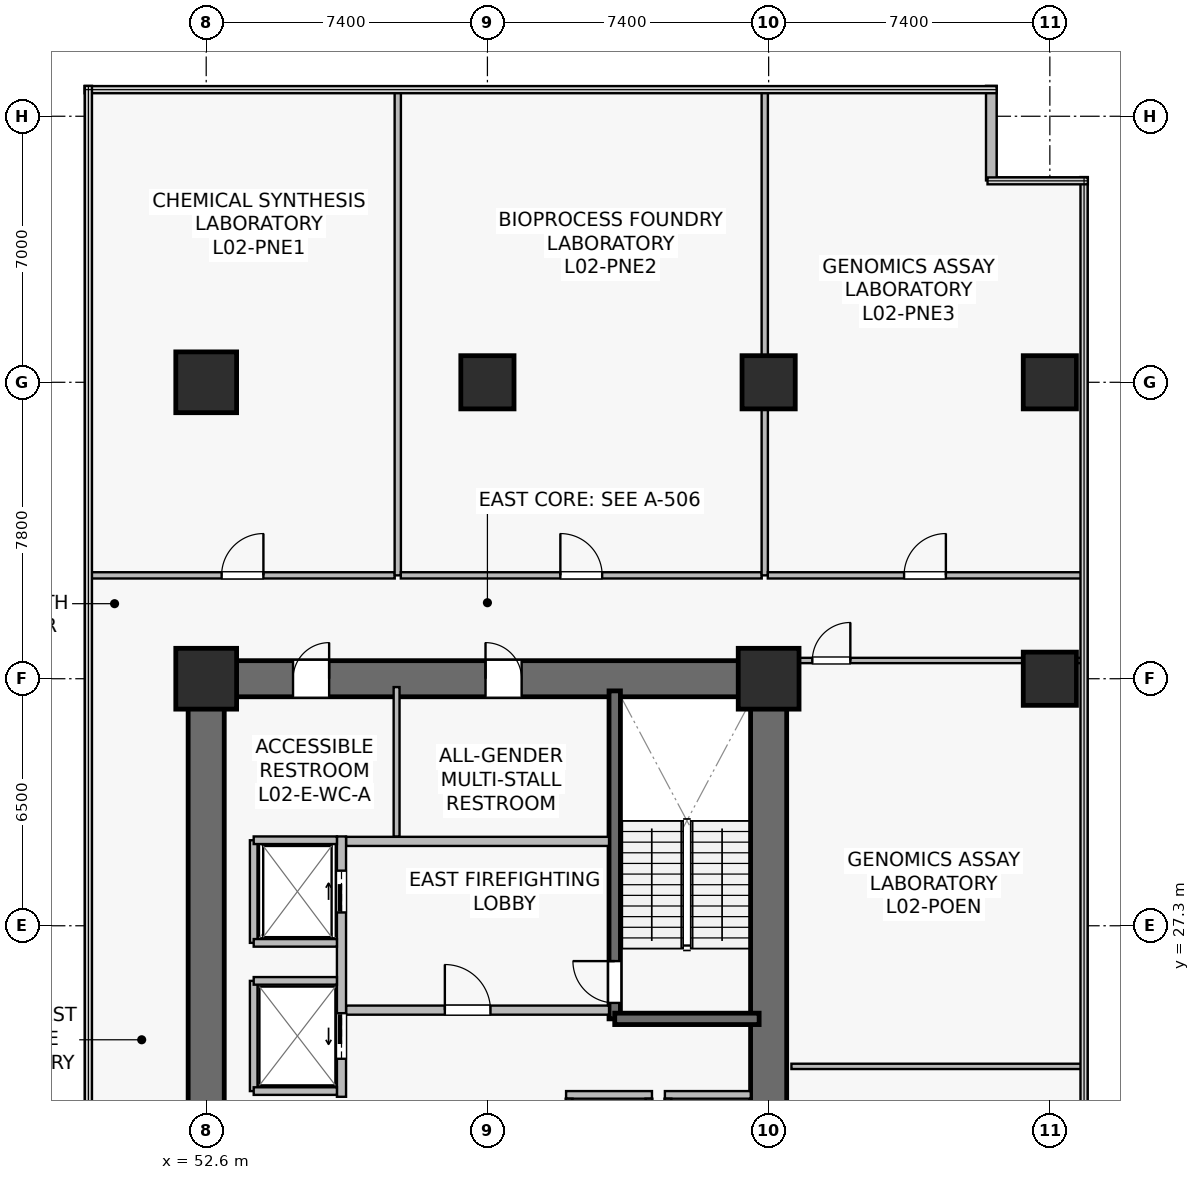
"""IFC4 building model, lengths in metres.
Left out: names, types, materials, properties, quantities, classifications, styles, units other than length and angle.
Written with IfcOpenShell. Run it as: python <this file> out.ifc"""

import sys

from ifc_helpers import new_model, si_unit, direction, frame, frame_2d, origin, origin_2d, place, context, subcontext, project, spatial, rectangle, extrude, source, transform, mapped, element, fill, save


model = new_model("IFC4")
c1 = context("Model", 3, precision=1e-05, world=origin(), true_north=direction((0.0, 1.0)))
c2 = subcontext(c1, "Body", "Model", "MODEL_VIEW")
j1 = project(units=[si_unit("LENGTHUNIT", "METRE"), si_unit("PLANEANGLEUNIT", "RADIAN")], contexts=[c1])
p1 = place(None, origin())
s1 = spatial("IfcSite", under=j1, at=p1, CompositionType="ELEMENT")
p2 = place(p1, origin())
s2 = spatial("IfcBuilding", under=s1, at=p2, CompositionType="ELEMENT")
p3 = place(p2, frame((0.0, 0.0, 5.4)))
s3 = spatial("IfcBuildingStorey", under=s2, at=p3, CompositionType="ELEMENT", Elevation=5.4)
p4 = place(p3, frame((52.125, 33.8, 0.0), z_axis=(0.0, 0.0, 1.0), x_axis=(1.0, 0.0, 0.0)))
e1 = element("IfcWall", 1, at=p4, inside=s3, PredefinedType="SHEAR", context=c2, shape_type="SweptSolid", body=[
    extrude(rectangle(XDim=15.75, YDim=0.95, at=frame_2d((7.875, 0.0))), origin(), (0.0, 0.0, 1.0), 4.45),
])
p5 = place(p4, frame((7.825, 0.0, 0.0)))
e2 = element("IfcOpeningElement", 2, at=p5, cuts=e1, PredefinedType="OPENING", context=c2, shape_type="SweptSolid", body=[
    extrude(rectangle(XDim=0.95, YDim=2.15, at=frame_2d((0.475, 1.075))), frame((0.0, 0.485, 0.0), z_axis=(0.0, -1.0, 0.0), x_axis=(1.0, 0.0, 0.0)), (0.0, 0.0, 1.0), 0.97),
])
p6 = place(p4, frame((2.76, 0.0, 0.0)))
e3 = element("IfcOpeningElement", 3, at=p6, cuts=e1, PredefinedType="OPENING", context=c2, shape_type="SweptSolid", body=[
    extrude(rectangle(XDim=0.95, YDim=2.15, at=frame_2d((0.475, 1.075))), frame((0.0, 0.485, 0.0), z_axis=(0.0, -1.0, 0.0), x_axis=(1.0, 0.0, 0.0)), (0.0, 0.0, 1.0), 0.97),
])
p7 = place(p3, frame((52.6, 15.275, 0.0), z_axis=(0.0, 0.0, 1.0), x_axis=(0.0, 1.0, 0.0)))
e4 = element("IfcWall", 4, at=p7, inside=s3, PredefinedType="SHEAR", context=c2, shape_type="SweptSolid", body=[
    extrude(rectangle(XDim=18.05, YDim=0.95, at=frame_2d((9.025, 0.0))), origin(), (0.0, 0.0, 1.0), 4.45),
])
p8 = place(p7, frame((3.275, 0.0, 0.0)))
e5 = element("IfcOpeningElement", 5, at=p8, cuts=e4, PredefinedType="OPENING", context=c2, shape_type="SweptSolid", body=[
    extrude(rectangle(XDim=1.42, YDim=2.2, at=frame_2d((0.71, 1.1))), frame((0.0, 0.485, 0.0), z_axis=(0.0, -1.0, 0.0), x_axis=(1.0, 0.0, 0.0)), (0.0, 0.0, 1.0), 0.97),
])
p9 = place(p3, frame((67.4, 15.275, 0.0), z_axis=(0.0, 0.0, 1.0), x_axis=(0.0, 1.0, 0.0)))
e6 = element("IfcWall", 6, at=p9, inside=s3, PredefinedType="SHEAR", context=c2, shape_type="SweptSolid", body=[
    extrude(rectangle(XDim=18.05, YDim=0.95, at=frame_2d((9.025, 0.0))), origin(), (0.0, 0.0, 1.0), 4.45),
])
p10 = place(p3, frame((63.35, 24.85, 0.0), z_axis=(0.0, 0.0, 1.0), x_axis=(0.0, 1.0, 0.0)))
e7 = element("IfcWall", 7, at=p10, inside=s3, PredefinedType="SHEAR", context=c2, shape_type="SweptSolid", body=[
    extrude(rectangle(XDim=8.63, YDim=0.3, at=frame_2d((4.315, 0.0))), origin(), (0.0, 0.0, 1.0), 4.45),
])
p11 = place(p10, frame((0.42, 0.0, 0.0)))
e8 = element("IfcOpeningElement", 8, at=p11, cuts=e7, PredefinedType="OPENING", context=c2, shape_type="SweptSolid", body=[
    extrude(rectangle(XDim=1.1, YDim=2.15, at=frame_2d((0.55, 1.075))), frame((0.0, 0.16, 0.0), z_axis=(0.0, -1.0, 0.0), x_axis=(1.0, 0.0, 0.0)), (0.0, 0.0, 1.0), 0.32),
])
p12 = place(p3, frame((63.35, 24.85, 0.0), z_axis=(0.0, 0.0, 1.0), x_axis=(1.0, 0.0, 0.0)))
e9 = element("IfcWall", 9, at=p12, inside=s3, PredefinedType="SHEAR", context=c2, shape_type="SweptSolid", body=[
    extrude(rectangle(XDim=3.8, YDim=0.3, at=frame_2d((1.9, 0.0))), origin(), (0.0, 0.0, 1.0), 4.45),
])
m1 = source(origin(), c2, "Body", "SweptSolid", [
    extrude(rectangle(XDim=1.6, YDim=1.6, at=origin_2d()), origin(), (0.0, 0.0, 1.0), 4.8),
])
for number, where, z_axis, x_axis in (
    (10, (52.6, 33.8, 0.0), (0.0, 0.0, 1.0), (1.0, 0.0, 0.0)),
    (11, (67.4, 33.8, 0.0), (0.0, 0.0, 1.0), (1.0, 0.0, 0.0)),
    (12, (52.6, 41.6, 0.0), (0.0, 0.0, 1.0), (1.0, 0.0, 0.0)),
):
    element("IfcColumn", number, at=place(p3, frame(where, z_axis=z_axis, x_axis=x_axis)), inside=s3, PredefinedType="COLUMN", context=c2, shape_type="MappedRepresentation", body=[
        mapped(m1, transform((0.0, 0.0, 0.0), scale=1.0)),
    ])
m2 = source(origin(), c2, "Body", "SweptSolid", [
    extrude(rectangle(XDim=1.4, YDim=1.4, at=origin_2d()), origin(), (0.0, 0.0, 1.0), 4.8),
])
for number, where, z_axis, x_axis in (
    (13, (60.0, 41.6, 0.0), (0.0, 0.0, 1.0), (1.0, 0.0, 0.0)),
    (14, (67.4, 41.6, 0.0), (0.0, 0.0, 1.0), (1.0, 0.0, 0.0)),
    (15, (74.8, 33.8, 0.0), (0.0, 0.0, 1.0), (1.0, 0.0, 0.0)),
    (16, (74.8, 41.6, 0.0), (0.0, 0.0, 1.0), (1.0, 0.0, 0.0)),
):
    element("IfcColumn", number, at=place(p3, frame(where, z_axis=z_axis, x_axis=x_axis)), inside=s3, PredefinedType="COLUMN", context=c2, shape_type="MappedRepresentation", body=[
        mapped(m2, transform((0.0, 0.0, 0.0), scale=1.0)),
    ])
p13 = place(p3, frame((73.26, 46.912, 0.0), z_axis=(0.0, 0.0, 1.0), x_axis=(0.0, 1.0, 0.0)))
e17 = element("IfcWall", 17, at=p13, inside=s3, PredefinedType="STANDARD", context=c2, shape_type="SweptSolid", body=[
    extrude(rectangle(XDim=2.488, YDim=0.28, at=frame_2d((1.244, 0.0))), origin(), (0.0, 0.0, 1.0), 4.45),
])
p14 = place(p3, frame((56.28, 25.08, 0.0), z_axis=(0.0, 0.0, 1.0), x_axis=(1.0, 0.0, 0.0)))
e18 = element("IfcWall", 18, at=p14, inside=s3, PredefinedType="SOLIDWALL", context=c2, shape_type="SweptSolid", body=[
    extrude(rectangle(XDim=6.92, YDim=0.24, at=frame_2d((3.46, 0.0))), origin(), (0.0, 0.0, 1.0), 3.735),
])
p15 = place(p14, frame((2.6, 0.0, 0.0)))
e19 = element("IfcOpeningElement", 19, at=p15, cuts=e18, PredefinedType="OPENING", context=c2, shape_type="SweptSolid", body=[
    extrude(rectangle(XDim=1.2, YDim=2.16, at=frame_2d((0.6, 1.08))), frame((0.0, 0.13, 0.0), z_axis=(0.0, -1.0, 0.0), x_axis=(1.0, 0.0, 0.0)), (0.0, 0.0, 1.0), 0.26),
])
p16 = place(p3, frame((56.28, 29.52, 0.0), z_axis=(0.0, 0.0, 1.0), x_axis=(1.0, 0.0, 0.0)))
e20 = element("IfcWall", 20, at=p16, inside=s3, PredefinedType="SOLIDWALL", context=c2, shape_type="SweptSolid", body=[
    extrude(rectangle(XDim=6.92, YDim=0.24, at=frame_2d((3.46, 0.0))), origin(), (0.0, 0.0, 1.0), 3.735),
])
p17 = place(p3, frame((56.16, 22.8, 0.0), z_axis=(0.0, 0.0, 1.0), x_axis=(0.0, 1.0, 0.0)))
e21 = element("IfcWall", 21, at=p17, inside=s3, PredefinedType="SOLIDWALL", context=c2, shape_type="SweptSolid", body=[
    extrude(rectangle(XDim=6.85, YDim=0.24, at=frame_2d((3.425, 0.0))), origin(), (0.0, 0.0, 1.0), 3.535),
])
p18 = place(p17, frame((4.85, 0.0, 0.0)))
e22 = element("IfcOpeningElement", 22, at=p18, cuts=e21, PredefinedType="OPENING", context=c2, shape_type="SweptSolid", body=[
    extrude(rectangle(XDim=1.1, YDim=2.22, at=frame_2d((0.55, 1.11))), frame((0.0, 0.13, 0.0), z_axis=(0.0, -1.0, 0.0), x_axis=(1.0, 0.0, 0.0)), (0.0, 0.0, 1.0), 0.26),
])
p19 = place(p17, frame((1.0, 0.0, 0.0)))
e23 = element("IfcOpeningElement", 23, at=p19, cuts=e21, PredefinedType="OPENING", context=c2, shape_type="SweptSolid", body=[
    extrude(rectangle(XDim=1.2, YDim=2.22, at=frame_2d((0.6, 1.11))), frame((0.0, 0.13, 0.0), z_axis=(0.0, -1.0, 0.0), x_axis=(1.0, 0.0, 0.0)), (0.0, 0.0, 1.0), 0.26),
])
p20 = place(p3, frame((64.67, 22.85, 0.0), z_axis=(0.0, 0.0, 1.0), x_axis=(1.0, 0.0, 0.0)))
e24 = element("IfcWall", 24, at=p20, inside=s3, PredefinedType="SOLIDWALL", context=c2, shape_type="SweptSolid", body=[
    extrude(rectangle(XDim=2.26, YDim=0.2, at=frame_2d((1.13, 0.0))), origin(), (0.0, 0.0, 1.0), 4.45),
])
p21 = place(p3, frame((64.75, 20.85, 0.0), z_axis=(0.0, 0.0, 1.0), x_axis=(0.0, 1.0, 0.0)))
e25 = element("IfcWall", 25, at=p21, inside=s3, PredefinedType="SOLIDWALL", context=c2, shape_type="SweptSolid", body=[
    extrude(rectangle(XDim=1.9, YDim=0.18, at=frame_2d((0.95, 0.0))), origin(), (0.0, 0.0, 1.0), 4.45),
])
p22 = place(p3, frame((62.07, 22.85, 0.0), z_axis=(0.0, 0.0, 1.0), x_axis=(1.0, 0.0, 0.0)))
e26 = element("IfcWall", 26, at=p22, inside=s3, PredefinedType="SOLIDWALL", context=c2, shape_type="SweptSolid", body=[
    extrude(rectangle(XDim=2.26, YDim=0.2, at=frame_2d((1.13, 0.0))), origin(), (0.0, 0.0, 1.0), 4.45),
])
for number, where, z_axis, x_axis in (
    (27, (62.15, 20.85, 0.0), (0.0, 0.0, 1.0), (0.0, 1.0, 0.0)),
    (28, (64.25, 20.85, 0.0), (0.0, 0.0, 1.0), (0.0, 1.0, 0.0)),
):
    element("IfcWall", number, at=place(p3, frame(where, z_axis=z_axis, x_axis=x_axis)), inside=s3, PredefinedType="SOLIDWALL", context=c2, shape_type="SweptSolid", body=[
        extrude(rectangle(XDim=1.9, YDim=0.18, at=frame_2d((0.95, 0.0))), origin(), (0.0, 0.0, 1.0), 4.45),
    ])
p23 = place(p3, frame((53.85, 26.85, 0.0), z_axis=(0.0, 0.0, 1.0), x_axis=(0.0, 1.0, 0.0)))
e29 = element("IfcWall", 29, at=p23, inside=s3, PredefinedType="SOLIDWALL", context=c2, shape_type="SweptSolid", body=[
    extrude(rectangle(XDim=2.7, YDim=0.2, at=frame_2d((1.35, 0.0))), origin(), (0.0, 0.0, 1.0), 4.45),
])
p24 = place(p3, frame((53.85, 29.55, 0.0), z_axis=(0.0, 0.0, 1.0), x_axis=(1.0, 0.0, 0.0)))
e30 = element("IfcWall", 30, at=p24, inside=s3, PredefinedType="SOLIDWALL", context=c2, shape_type="SweptSolid", body=[
    extrude(rectangle(XDim=2.19, YDim=0.2, at=frame_2d((1.095, 0.0))), origin(), (0.0, 0.0, 1.0), 4.45),
])
p25 = place(p3, frame((53.85, 26.85, 0.0), z_axis=(0.0, 0.0, 1.0), x_axis=(1.0, 0.0, 0.0)))
e31 = element("IfcWall", 31, at=p25, inside=s3, PredefinedType="SOLIDWALL", context=c2, shape_type="SweptSolid", body=[
    extrude(rectangle(XDim=2.19, YDim=0.2, at=frame_2d((1.095, 0.0))), origin(), (0.0, 0.0, 1.0), 3.847),
])
p26 = place(p3, frame((53.85, 22.95, 0.0), z_axis=(0.0, 0.0, 1.0), x_axis=(0.0, 1.0, 0.0)))
e32 = element("IfcWall", 32, at=p26, inside=s3, PredefinedType="SOLIDWALL", context=c2, shape_type="SweptSolid", body=[
    extrude(rectangle(XDim=2.9, YDim=0.2, at=frame_2d((1.45, 0.0))), origin(), (0.0, 0.0, 1.0), 3.535),
])
for number, where, z_axis, x_axis in (
    (33, (53.85, 25.85, 0.0), (0.0, 0.0, 1.0), (1.0, 0.0, 0.0)),
    (34, (53.85, 22.95, 0.0), (0.0, 0.0, 1.0), (1.0, 0.0, 0.0)),
):
    element("IfcWall", number, at=place(p3, frame(where, z_axis=z_axis, x_axis=x_axis)), inside=s3, PredefinedType="SOLIDWALL", context=c2, shape_type="SweptSolid", body=[
        extrude(rectangle(XDim=2.19, YDim=0.2, at=frame_2d((1.095, 0.0))), origin(), (0.0, 0.0, 1.0), 4.45),
    ])
p27 = place(p3, frame((57.61, 29.65, 0.0), z_axis=(0.0, 0.0, 1.0), x_axis=(0.0, 1.0, 0.0)))
e35 = element("IfcWall", 35, at=p27, inside=s3, PredefinedType="PLUMBINGWALL", context=c2, shape_type="SweptSolid", body=[
    extrude(rectangle(XDim=3.93, YDim=0.155, at=frame_2d((1.965, 0.0))), origin(), (0.0, 0.0, 1.0), 4.45),
])
p28 = place(p3, frame((68.0, 23.6, 0.0), z_axis=(0.0, 0.0, 1.0), x_axis=(1.0, 0.0, 0.0)))
e36 = element("IfcWall", 36, at=p28, inside=s3, PredefinedType="PARTITIONING", context=c2, shape_type="SweptSolid", body=[
    extrude(rectangle(XDim=7.65, YDim=0.14, at=frame_2d((3.825, 0.0))), origin(), (0.0, 0.0, 1.0), 3.835),
])
p29 = place(p3, frame((68.0, 34.28, 0.0), z_axis=(0.0, 0.0, 1.0), x_axis=(1.0, 0.0, 0.0)))
e37 = element("IfcWall", 37, at=p29, inside=s3, PredefinedType="PARTITIONING", context=c2, shape_type="SweptSolid", body=[
    extrude(rectangle(XDim=7.65, YDim=0.14, at=frame_2d((3.825, 0.0))), origin(), (0.0, 0.0, 1.0), 3.835),
])
p30 = place(p29, frame((0.55, 0.0, 0.0)))
e38 = element("IfcOpeningElement", 38, at=p30, cuts=e37, PredefinedType="OPENING", context=c2, shape_type="SweptSolid", body=[
    extrude(rectangle(XDim=1.0, YDim=2.15, at=frame_2d((0.5, 1.075))), frame((0.0, 0.08, 0.0), z_axis=(0.0, -1.0, 0.0), x_axis=(1.0, 0.0, 0.0)), (0.0, 0.0, 1.0), 0.16),
])
p31 = place(p3, frame((49.55, 36.52, 0.0), z_axis=(0.0, 0.0, 1.0), x_axis=(1.0, 0.0, 0.0)))
e39 = element("IfcWall", 39, at=p31, inside=s3, PredefinedType="PARTITIONING", context=c2, shape_type="SweptSolid", body=[
    extrude(rectangle(XDim=8.011, YDim=0.165, at=frame_2d((4.005, 0.0))), origin(), (0.0, 0.0, 1.0), 3.735),
])
p32 = place(p31, frame((3.456, 0.0, 0.0)))
e40 = element("IfcOpeningElement", 40, at=p32, cuts=e39, PredefinedType="OPENING", context=c2, shape_type="SweptSolid", body=[
    extrude(rectangle(XDim=1.1, YDim=2.18, at=frame_2d((0.55, 1.09))), frame((0.0, 0.093, 0.0), z_axis=(0.0, -1.0, 0.0), x_axis=(1.0, 0.0, 0.0)), (0.0, 0.0, 1.0), 0.185),
])
p33 = place(p3, frame((57.641, 36.52, 0.0), z_axis=(0.0, 0.0, 1.0), x_axis=(0.0, 1.0, 0.0)))
e41 = element("IfcWall", 41, at=p33, inside=s3, PredefinedType="PARTITIONING", context=c2, shape_type="SweptSolid", body=[
    extrude(rectangle(XDim=12.77, YDim=0.165, at=frame_2d((6.385, 0.0))), origin(), (0.0, 0.0, 1.0), 3.635),
])
p34 = place(p3, frame((57.721, 36.52, 0.0), z_axis=(0.0, 0.0, 1.0), x_axis=(1.0, 0.0, 0.0)))
e42 = element("IfcWall", 42, at=p34, inside=s3, PredefinedType="PARTITIONING", context=c2, shape_type="SweptSolid", body=[
    extrude(rectangle(XDim=9.497, YDim=0.165, at=frame_2d((4.749, 0.0))), origin(), (0.0, 0.0, 1.0), 3.735),
])
p35 = place(p34, frame((4.198, 0.0, 0.0)))
e43 = element("IfcOpeningElement", 43, at=p35, cuts=e42, PredefinedType="OPENING", context=c2, shape_type="SweptSolid", body=[
    extrude(rectangle(XDim=1.1, YDim=2.18, at=frame_2d((0.55, 1.09))), frame((0.0, 0.093, 0.0), z_axis=(0.0, -1.0, 0.0), x_axis=(1.0, 0.0, 0.0)), (0.0, 0.0, 1.0), 0.185),
])
p36 = place(p3, frame((67.298, 36.52, 0.0), z_axis=(0.0, 0.0, 1.0), x_axis=(0.0, 1.0, 0.0)))
e44 = element("IfcWall", 44, at=p36, inside=s3, PredefinedType="PARTITIONING", context=c2, shape_type="SweptSolid", body=[
    extrude(rectangle(XDim=12.77, YDim=0.165, at=frame_2d((6.385, 0.0))), origin(), (0.0, 0.0, 1.0), 3.635),
])
p37 = place(p3, frame((67.378, 36.52, 0.0), z_axis=(0.0, 0.0, 1.0), x_axis=(1.0, 0.0, 0.0)))
e45 = element("IfcWall", 45, at=p37, inside=s3, PredefinedType="PARTITIONING", context=c2, shape_type="SweptSolid", body=[
    extrude(rectangle(XDim=8.272, YDim=0.165, at=frame_2d((4.136, 0.0))), origin(), (0.0, 0.0, 1.0), 3.735),
])
p38 = place(p37, frame((3.586, 0.0, 0.0)))
e46 = element("IfcOpeningElement", 46, at=p38, cuts=e45, PredefinedType="OPENING", context=c2, shape_type="SweptSolid", body=[
    extrude(rectangle(XDim=1.1, YDim=2.18, at=frame_2d((0.55, 1.09))), frame((0.0, 0.093, 0.0), z_axis=(0.0, -1.0, 0.0), x_axis=(1.0, 0.0, 0.0)), (0.0, 0.0, 1.0), 0.185),
])
m3 = source(origin(), c2, "Body", "SweptSolid", [
    extrude(rectangle(XDim=1.1, YDim=2.15, at=frame_2d((0.55, 1.075))), frame((0.0, 0.025, 0.0), z_axis=(0.0, -1.0, 0.0), x_axis=(1.0, 0.0, 0.0)), (0.0, 0.0, 1.0), 0.05),
])
p39 = place(p11, origin())
e47 = element("IfcDoor", 47, at=p39, inside=s3, OperationType="SINGLE_SWING_RIGHT", PredefinedType="DOOR", context=c2, shape_type="MappedRepresentation", body=[
    mapped(m3, transform((0.0, 0.0, 0.0), scale=1.0)),
])
fill(e8, e47)
m4 = source(origin(), c2, "Body", "SweptSolid", [
    extrude(rectangle(XDim=1.2, YDim=2.16, at=frame_2d((0.6, 1.08))), frame((0.0, 0.025, 0.0), z_axis=(0.0, -1.0, 0.0), x_axis=(1.0, 0.0, 0.0)), (0.0, 0.0, 1.0), 0.05),
])
p40 = place(p15, origin())
e48 = element("IfcDoor", 48, at=p40, inside=s3, OperationType="SINGLE_SWING_LEFT", PredefinedType="DOOR", context=c2, shape_type="MappedRepresentation", body=[
    mapped(m4, transform((0.0, 0.0, 0.0), scale=1.0)),
])
fill(e19, e48)
m5 = source(origin(), c2, "Body", "SweptSolid", [
    extrude(rectangle(XDim=1.1, YDim=2.22, at=frame_2d((0.55, 1.11))), frame((0.0, 0.025, 0.0), z_axis=(0.0, -1.0, 0.0), x_axis=(1.0, 0.0, 0.0)), (0.0, 0.0, 1.0), 0.05),
])
p41 = place(p18, origin())
e49 = element("IfcDoor", 49, at=p41, inside=s3, OperationType="SLIDING_TO_RIGHT", PredefinedType="USERDEFINED", context=c2, shape_type="MappedRepresentation", body=[
    mapped(m5, transform((0.0, 0.0, 0.0), scale=1.0)),
])
fill(e22, e49)
m6 = source(origin(), c2, "Body", "SweptSolid", [
    extrude(rectangle(XDim=1.2, YDim=2.22, at=frame_2d((0.6, 1.11))), frame((0.0, 0.025, 0.0), z_axis=(0.0, -1.0, 0.0), x_axis=(1.0, 0.0, 0.0)), (0.0, 0.0, 1.0), 0.05),
])
p42 = place(p19, origin())
e50 = element("IfcDoor", 50, at=p42, inside=s3, OperationType="SLIDING_TO_LEFT", PredefinedType="USERDEFINED", context=c2, shape_type="MappedRepresentation", body=[
    mapped(m6, transform((0.0, 0.0, 0.0), scale=1.0)),
])
fill(e23, e50)
m7 = source(origin(), c2, "Body", "SweptSolid", [
    extrude(rectangle(XDim=0.95, YDim=2.15, at=frame_2d((0.475, 1.075))), frame((0.0, 0.025, 0.0), z_axis=(0.0, -1.0, 0.0), x_axis=(1.0, 0.0, 0.0)), (0.0, 0.0, 1.0), 0.05),
])
p43 = place(p5, origin())
e51 = element("IfcDoor", 51, at=p43, inside=s3, OperationType="SINGLE_SWING_LEFT", PredefinedType="DOOR", context=c2, shape_type="MappedRepresentation", body=[
    mapped(m7, transform((0.0, 0.0, 0.0), scale=1.0)),
])
fill(e2, e51)
p44 = place(p6, origin())
e52 = element("IfcDoor", 52, at=p44, inside=s3, OperationType="SINGLE_SWING_RIGHT", PredefinedType="DOOR", context=c2, shape_type="MappedRepresentation", body=[
    mapped(m7, transform((0.0, 0.0, 0.0), scale=1.0)),
])
fill(e3, e52)
m8 = source(origin(), c2, "Body", "SweptSolid", [
    extrude(rectangle(XDim=1.0, YDim=2.15, at=frame_2d((0.5, 1.075))), frame((0.0, 0.025, 0.0), z_axis=(0.0, -1.0, 0.0), x_axis=(1.0, 0.0, 0.0)), (0.0, 0.0, 1.0), 0.05),
])
p45 = place(p30, origin())
e53 = element("IfcDoor", 53, at=p45, inside=s3, OperationType="SINGLE_SWING_RIGHT", PredefinedType="DOOR", context=c2, shape_type="MappedRepresentation", body=[
    mapped(m8, transform((0.0, 0.0, 0.0), scale=1.0)),
])
fill(e38, e53)
m9 = source(origin(), c2, "Body", "SweptSolid", [
    extrude(rectangle(XDim=1.1, YDim=2.18, at=frame_2d((0.55, 1.09))), frame((0.0, 0.025, 0.0), z_axis=(0.0, -1.0, 0.0), x_axis=(1.0, 0.0, 0.0)), (0.0, 0.0, 1.0), 0.05),
])
p46 = place(p32, origin())
e54 = element("IfcDoor", 54, at=p46, inside=s3, OperationType="SINGLE_SWING_RIGHT", PredefinedType="DOOR", context=c2, shape_type="MappedRepresentation", body=[
    mapped(m9, transform((0.0, 0.0, 0.0), scale=1.0)),
])
fill(e40, e54)
p47 = place(p35, origin())
e55 = element("IfcDoor", 55, at=p47, inside=s3, OperationType="SINGLE_SWING_LEFT", PredefinedType="DOOR", context=c2, shape_type="MappedRepresentation", body=[
    mapped(m9, transform((0.0, 0.0, 0.0), scale=1.0)),
])
fill(e43, e55)
p48 = place(p38, origin())
e56 = element("IfcDoor", 56, at=p48, inside=s3, OperationType="SINGLE_SWING_RIGHT", PredefinedType="DOOR", context=c2, shape_type="MappedRepresentation", body=[
    mapped(m9, transform((0.0, 0.0, 0.0), scale=1.0)),
])
fill(e46, e56)
save(model, sys.argv[1])
